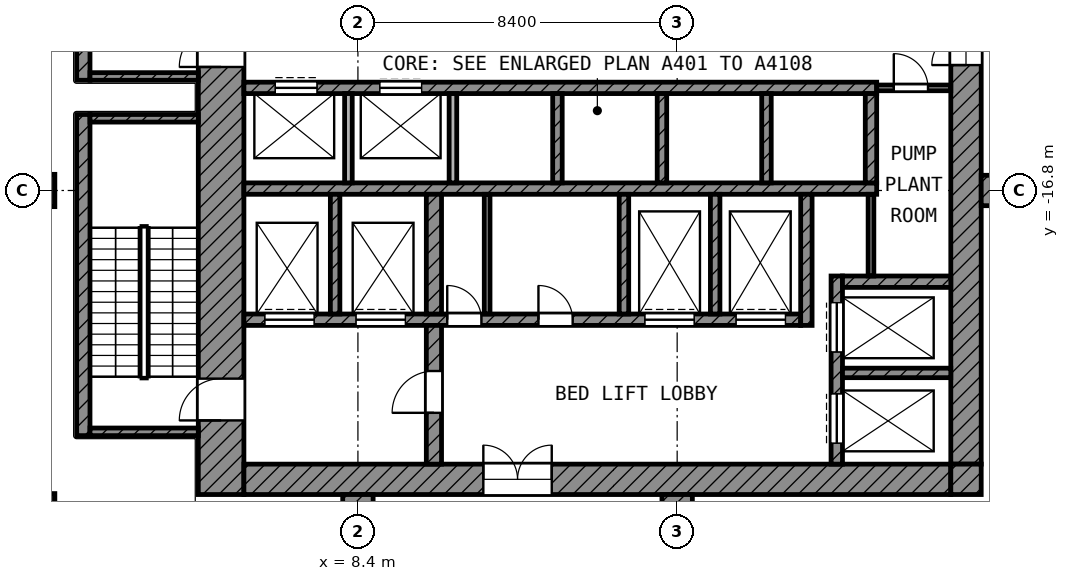
"""IFC4 building model, lengths in metres.
Left out: names, types, materials, properties, quantities, classifications, styles, units other than length and angle.
Written with IfcOpenShell. Run it as: python <this file> out.ifc"""

import sys

from ifc_helpers import new_model, si_unit, direction, frame, frame_2d, origin, origin_2d, place, context, subcontext, project, spatial, rectangle, extrude, element, fill, save


model = new_model("IFC4")
c1 = context("Model", 3, precision=1e-05, world=origin(), true_north=direction((0.0, 1.0)))
c2 = subcontext(c1, "Body", "Model", "MODEL_VIEW")
j1 = project(units=[si_unit("LENGTHUNIT", "METRE"), si_unit("PLANEANGLEUNIT", "RADIAN")], contexts=[c1])
p1 = place(None, origin())
s1 = spatial("IfcSite", under=j1, at=p1, CompositionType="ELEMENT")
p2 = place(p1, origin())
s2 = spatial("IfcBuilding", under=s1, at=p2, CompositionType="ELEMENT")
p3 = place(p2, frame((0.0, 0.0, 213.0)))
s3 = spatial("IfcBuildingStorey", under=s2, at=p3, CompositionType="ELEMENT", Elevation=213.0)
for number, where, z_axis, x_axis in (
    (1, (0.0, -16.8, 0.0), (0.0, 0.0, 1.0), (1.0, 0.0, 0.0)),
    (2, (0.0, -25.2, 0.0), (0.0, 0.0, 1.0), (1.0, 0.0, 0.0)),
):
    element("IfcColumn", number, at=place(p3, frame(where, z_axis=z_axis, x_axis=x_axis)), inside=s3, PredefinedType="COLUMN", context=c2, shape_type="SweptSolid", body=[
        extrude(rectangle(XDim=0.85, YDim=0.85, at=origin_2d()), origin(), (0.0, 0.0, 1.0), 5.0),
    ])
for number, where, z_axis, x_axis in (
    (3, (24.8, -16.8, 0.0), (0.0, 0.0, 1.0), (1.0, 0.0, 0.0)),
    (4, (8.4, -24.8, 0.0), (0.0, 0.0, 1.0), (0.0, -1.0, 0.0)),
    (5, (16.8, -24.8, 0.0), (0.0, 0.0, 1.0), (0.0, -1.0, 0.0)),
):
    element("IfcWall", number, at=place(p3, frame(where, z_axis=z_axis, x_axis=x_axis)), inside=s3, PredefinedType="SHEAR", context=c2, shape_type="SweptSolid", body=[
        extrude(rectangle(XDim=8.35, YDim=0.8, at=frame_2d((4.175, 0.0))), origin(), (0.0, 0.0, 1.0), 4.4),
    ])
p4 = place(p3, frame((4.8, -24.8, 0.0), z_axis=(0.0, 0.0, 1.0), x_axis=(0.0, 1.0, 0.0)))
e6 = element("IfcWall", 6, at=p4, inside=s3, PredefinedType="SHEAR", context=c2, shape_type="SweptSolid", body=[
    extrude(rectangle(XDim=19.4, YDim=1.2, at=frame_2d((9.7, 0.0))), origin(), (0.0, 0.0, 1.0), 4.4),
])
p5 = place(p4, frame((11.25, 0.0, 0.0)))
e7 = element("IfcOpeningElement", 7, at=p5, cuts=e6, PredefinedType="OPENING", context=c2, shape_type="SweptSolid", body=[
    extrude(rectangle(XDim=1.1, YDim=2.1, at=frame_2d((0.55, 1.05))), frame((0.0, 0.61, 0.0), z_axis=(0.0, -1.0, 0.0), x_axis=(1.0, 0.0, 0.0)), (0.0, 0.0, 1.0), 1.22),
])
p6 = place(p4, frame((1.95, 0.0, 0.0)))
e8 = element("IfcOpeningElement", 8, at=p6, cuts=e6, PredefinedType="OPENING", context=c2, shape_type="SweptSolid", body=[
    extrude(rectangle(XDim=1.1, YDim=2.1, at=frame_2d((0.55, 1.05))), frame((0.0, 0.61, 0.0), z_axis=(0.0, -1.0, 0.0), x_axis=(1.0, 0.0, 0.0)), (0.0, 0.0, 1.0), 1.22),
])
p7 = place(p3, frame((24.4, -24.0, 0.0), z_axis=(0.0, 0.0, 1.0), x_axis=(0.0, 1.0, 0.0)))
e9 = element("IfcWall", 9, at=p7, inside=s3, PredefinedType="SHEAR", context=c2, shape_type="SweptSolid", body=[
    extrude(rectangle(XDim=18.6, YDim=0.8, at=frame_2d((9.3, 0.0))), origin(), (0.0, 0.0, 1.0), 4.4),
])
p8 = place(p7, frame((10.5, 0.0, 0.0)))
e10 = element("IfcOpeningElement", 10, at=p8, cuts=e9, PredefinedType="OPENING", context=c2, shape_type="SweptSolid", body=[
    extrude(rectangle(XDim=1.8, YDim=2.1, at=frame_2d((0.9, 1.05))), frame((0.0, 0.41, 0.0), z_axis=(0.0, -1.0, 0.0), x_axis=(1.0, 0.0, 0.0)), (0.0, 0.0, 1.0), 0.82),
])
p9 = place(p3, frame((5.4, -24.4, 0.0), z_axis=(0.0, 0.0, 1.0), x_axis=(1.0, 0.0, 0.0)))
e11 = element("IfcWall", 11, at=p9, inside=s3, PredefinedType="SHEAR", context=c2, shape_type="SweptSolid", body=[
    extrude(rectangle(XDim=18.6, YDim=0.8, at=frame_2d((9.3, 0.0))), origin(), (0.0, 0.0, 1.0), 4.4),
])
p10 = place(p9, frame((6.3, 0.0, 0.0)))
e12 = element("IfcOpeningElement", 12, at=p10, cuts=e11, PredefinedType="OPENING", context=c2, shape_type="SweptSolid", body=[
    extrude(rectangle(XDim=1.8, YDim=2.1, at=frame_2d((0.9, 1.05))), frame((0.0, 0.41, 0.0), z_axis=(0.0, -1.0, 0.0), x_axis=(1.0, 0.0, 0.0)), (0.0, 0.0, 1.0), 0.82),
])
p11 = place(p3, frame((24.4, -24.8, 0.0), z_axis=(0.0, 0.0, 1.0), x_axis=(0.0, 1.0, 0.0)))
e13 = element("IfcWall", 13, at=p11, inside=s3, PredefinedType="SHEAR", context=c2, shape_type="SweptSolid", body=[
    extrude(rectangle(XDim=0.8, YDim=0.8, at=frame_2d((0.4, 0.0))), origin(), (0.0, 0.0, 1.0), 4.4),
])
p12 = place(p3, frame((5.4, -14.1, 0.0), z_axis=(0.0, 0.0, 1.0), x_axis=(1.0, 0.0, 0.0)))
e14 = element("IfcWall", 14, at=p12, inside=s3, PredefinedType="SHEAR", context=c2, shape_type="SweptSolid", body=[
    extrude(rectangle(XDim=16.65, YDim=0.3, at=frame_2d((8.325, 0.0))), origin(), (0.0, 0.0, 1.0), 4.4),
])
p13 = place(p12, frame((0.825, 0.0, 0.0)))
e15 = element("IfcOpeningElement", 15, at=p13, cuts=e14, PredefinedType="OPENING", context=c2, shape_type="SweptSolid", body=[
    extrude(rectangle(XDim=1.1, YDim=2.1, at=frame_2d((0.55, 1.05))), frame((0.0, 0.16, 0.0), z_axis=(0.0, -1.0, 0.0), x_axis=(1.0, 0.0, 0.0)), (0.0, 0.0, 1.0), 0.32),
])
p14 = place(p12, frame((3.575, 0.0, 0.0)))
e16 = element("IfcOpeningElement", 16, at=p14, cuts=e14, PredefinedType="OPENING", context=c2, shape_type="SweptSolid", body=[
    extrude(rectangle(XDim=1.1, YDim=2.1, at=frame_2d((0.55, 1.05))), frame((0.0, 0.16, 0.0), z_axis=(0.0, -1.0, 0.0), x_axis=(1.0, 0.0, 0.0)), (0.0, 0.0, 1.0), 0.32),
])
p15 = place(p3, frame((5.4, -16.75, 0.0), z_axis=(0.0, 0.0, 1.0), x_axis=(1.0, 0.0, 0.0)))
e17 = element("IfcWall", 17, at=p15, inside=s3, PredefinedType="SHEAR", context=c2, shape_type="SweptSolid", body=[
    extrude(rectangle(XDim=16.65, YDim=0.3, at=frame_2d((8.325, 0.0))), origin(), (0.0, 0.0, 1.0), 4.4),
])
p16 = place(p3, frame((5.4, -20.2, 0.0), z_axis=(0.0, 0.0, 1.0), x_axis=(1.0, 0.0, 0.0)))
e18 = element("IfcWall", 18, at=p16, inside=s3, PredefinedType="SHEAR", context=c2, shape_type="SweptSolid", body=[
    extrude(rectangle(XDim=14.65, YDim=0.3, at=frame_2d((7.325, 0.0))), origin(), (0.0, 0.0, 1.0), 4.4),
])
p17 = place(p16, frame((10.55, 0.0, 0.0)))
e19 = element("IfcOpeningElement", 19, at=p17, cuts=e18, PredefinedType="OPENING", context=c2, shape_type="SweptSolid", body=[
    extrude(rectangle(XDim=1.3, YDim=2.1, at=frame_2d((0.65, 1.05))), frame((0.0, 0.16, 0.0), z_axis=(0.0, -1.0, 0.0), x_axis=(1.0, 0.0, 0.0)), (0.0, 0.0, 1.0), 0.32),
])
p18 = place(p16, frame((12.95, 0.0, 0.0)))
e20 = element("IfcOpeningElement", 20, at=p18, cuts=e18, PredefinedType="OPENING", context=c2, shape_type="SweptSolid", body=[
    extrude(rectangle(XDim=1.3, YDim=2.1, at=frame_2d((0.65, 1.05))), frame((0.0, 0.16, 0.0), z_axis=(0.0, -1.0, 0.0), x_axis=(1.0, 0.0, 0.0)), (0.0, 0.0, 1.0), 0.32),
])
p19 = place(p16, frame((0.55, 0.0, 0.0)))
e21 = element("IfcOpeningElement", 21, at=p19, cuts=e18, PredefinedType="OPENING", context=c2, shape_type="SweptSolid", body=[
    extrude(rectangle(XDim=1.3, YDim=2.1, at=frame_2d((0.65, 1.05))), frame((0.0, 0.16, 0.0), z_axis=(0.0, -1.0, 0.0), x_axis=(1.0, 0.0, 0.0)), (0.0, 0.0, 1.0), 0.32),
])
p20 = place(p16, frame((2.95, 0.0, 0.0)))
e22 = element("IfcOpeningElement", 22, at=p20, cuts=e18, PredefinedType="OPENING", context=c2, shape_type="SweptSolid", body=[
    extrude(rectangle(XDim=1.3, YDim=2.1, at=frame_2d((0.65, 1.05))), frame((0.0, 0.16, 0.0), z_axis=(0.0, -1.0, 0.0), x_axis=(1.0, 0.0, 0.0)), (0.0, 0.0, 1.0), 0.32),
])
p21 = place(p16, frame((5.35, 0.0, 0.0)))
e23 = element("IfcOpeningElement", 23, at=p21, cuts=e18, PredefinedType="OPENING", context=c2, shape_type="SweptSolid", body=[
    extrude(rectangle(XDim=0.9, YDim=2.1, at=frame_2d((0.45, 1.05))), frame((0.0, 0.16, 0.0), z_axis=(0.0, -1.0, 0.0), x_axis=(1.0, 0.0, 0.0)), (0.0, 0.0, 1.0), 0.32),
])
p22 = place(p16, frame((7.75, 0.0, 0.0)))
e24 = element("IfcOpeningElement", 24, at=p22, cuts=e18, PredefinedType="OPENING", context=c2, shape_type="SweptSolid", body=[
    extrude(rectangle(XDim=0.9, YDim=2.1, at=frame_2d((0.45, 1.05))), frame((0.0, 0.16, 0.0), z_axis=(0.0, -1.0, 0.0), x_axis=(1.0, 0.0, 0.0)), (0.0, 0.0, 1.0), 0.32),
])
p23 = place(p3, frame((10.4, -24.0, 0.0), z_axis=(0.0, 0.0, 1.0), x_axis=(0.0, 1.0, 0.0)))
e25 = element("IfcWall", 25, at=p23, inside=s3, PredefinedType="SHEAR", context=c2, shape_type="SweptSolid", body=[
    extrude(rectangle(XDim=3.65, YDim=0.4, at=frame_2d((1.825, 0.0))), origin(), (0.0, 0.0, 1.0), 4.4),
])
p24 = place(p23, frame((1.35, 0.0, 0.0)))
e26 = element("IfcOpeningElement", 26, at=p24, cuts=e25, PredefinedType="OPENING", context=c2, shape_type="SweptSolid", body=[
    extrude(rectangle(XDim=1.1, YDim=2.1, at=frame_2d((0.55, 1.05))), frame((0.0, 0.21, 0.0), z_axis=(0.0, -1.0, 0.0), x_axis=(1.0, 0.0, 0.0)), (0.0, 0.0, 1.0), 0.42),
])
p25 = place(p3, frame((10.4, -20.05, 0.0), z_axis=(0.0, 0.0, 1.0), x_axis=(0.0, 1.0, 0.0)))
e27 = element("IfcWall", 27, at=p25, inside=s3, PredefinedType="SHEAR", context=c2, shape_type="SweptSolid", body=[
    extrude(rectangle(XDim=3.15, YDim=0.4, at=frame_2d((1.575, 0.0))), origin(), (0.0, 0.0, 1.0), 4.4),
])
p26 = place(p3, frame((20.2, -20.35, 0.0), z_axis=(0.0, 0.0, 1.0), x_axis=(0.0, 1.0, 0.0)))
e28 = element("IfcWall", 28, at=p26, inside=s3, PredefinedType="SHEAR", context=c2, shape_type="SweptSolid", body=[
    extrude(rectangle(XDim=3.45, YDim=0.3, at=frame_2d((1.725, 0.0))), origin(), (0.0, 0.0, 1.0), 4.4),
])
p27 = place(p3, frame((21.9, -16.6, 0.0), z_axis=(0.0, 0.0, 1.0), x_axis=(0.0, 1.0, 0.0)))
e29 = element("IfcWall", 29, at=p27, inside=s3, PredefinedType="SHEAR", context=c2, shape_type="SweptSolid", body=[
    extrude(rectangle(XDim=2.35, YDim=0.3, at=frame_2d((1.175, 0.0))), origin(), (0.0, 0.0, 1.0), 4.4),
])
p28 = place(p3, frame((21.15, -19.2, 0.0), z_axis=(0.0, 0.0, 1.0), x_axis=(1.0, 0.0, 0.0)))
e30 = element("IfcWall", 30, at=p28, inside=s3, PredefinedType="SHEAR", context=c2, shape_type="SweptSolid", body=[
    extrude(rectangle(XDim=2.85, YDim=0.3, at=frame_2d((1.425, 0.0))), origin(), (0.0, 0.0, 1.0), 4.4),
])
p29 = place(p3, frame((21.0, -24.0, 0.0), z_axis=(0.0, 0.0, 1.0), x_axis=(0.0, 1.0, 0.0)))
e31 = element("IfcWall", 31, at=p29, inside=s3, PredefinedType="SHEAR", context=c2, shape_type="SweptSolid", body=[
    extrude(rectangle(XDim=4.95, YDim=0.3, at=frame_2d((2.475, 0.0))), origin(), (0.0, 0.0, 1.0), 4.4),
])
p30 = place(p29, frame((2.95, 0.0, 0.0)))
e32 = element("IfcOpeningElement", 32, at=p30, cuts=e31, PredefinedType="OPENING", context=c2, shape_type="SweptSolid", body=[
    extrude(rectangle(XDim=1.3, YDim=2.1, at=frame_2d((0.65, 1.05))), frame((0.0, 0.16, 0.0), z_axis=(0.0, -1.0, 0.0), x_axis=(1.0, 0.0, 0.0)), (0.0, 0.0, 1.0), 0.32),
])
p31 = place(p29, frame((0.55, 0.0, 0.0)))
e33 = element("IfcOpeningElement", 33, at=p31, cuts=e31, PredefinedType="OPENING", context=c2, shape_type="SweptSolid", body=[
    extrude(rectangle(XDim=1.3, YDim=2.1, at=frame_2d((0.65, 1.05))), frame((0.0, 0.16, 0.0), z_axis=(0.0, -1.0, 0.0), x_axis=(1.0, 0.0, 0.0)), (0.0, 0.0, 1.0), 0.32),
])
p32 = place(p3, frame((21.15, -21.6, 0.0), z_axis=(0.0, 0.0, 1.0), x_axis=(1.0, 0.0, 0.0)))
e34 = element("IfcWall", 34, at=p32, inside=s3, PredefinedType="SHEAR", context=c2, shape_type="SweptSolid", body=[
    extrude(rectangle(XDim=2.85, YDim=0.25, at=frame_2d((1.425, 0.0))), origin(), (0.0, 0.0, 1.0), 4.4),
])
for number, where, z_axis, x_axis in (
    (35, (7.8, -20.05, 0.0), (0.0, 0.0, 1.0), (0.0, 1.0, 0.0)),
    (36, (15.4, -20.05, 0.0), (0.0, 0.0, 1.0), (0.0, 1.0, 0.0)),
    (37, (17.8, -20.05, 0.0), (0.0, 0.0, 1.0), (0.0, 1.0, 0.0)),
):
    element("IfcWall", number, at=place(p3, frame(where, z_axis=z_axis, x_axis=x_axis)), inside=s3, PredefinedType="SHEAR", context=c2, shape_type="SweptSolid", body=[
        extrude(rectangle(XDim=3.15, YDim=0.25, at=frame_2d((1.575, 0.0))), origin(), (0.0, 0.0, 1.0), 4.4),
    ])
for number, where, z_axis, x_axis in (
    (38, (8.15, -16.6, 0.0), (0.0, 0.0, 1.0), (0.0, 1.0, 0.0)),
    (39, (10.9, -16.6, 0.0), (0.0, 0.0, 1.0), (0.0, 1.0, 0.0)),
):
    element("IfcWall", number, at=place(p3, frame(where, z_axis=z_axis, x_axis=x_axis)), inside=s3, PredefinedType="PARTITIONING", context=c2, shape_type="SweptSolid", body=[
        extrude(rectangle(XDim=2.35, YDim=0.2, at=frame_2d((1.175, 0.0))), origin(), (0.0, 0.0, 1.0), 4.4),
    ])
for number, where, z_axis, x_axis in (
    (40, (13.65, -16.6, 0.0), (0.0, 0.0, 1.0), (0.0, 1.0, 0.0)),
    (41, (16.4, -16.6, 0.0), (0.0, 0.0, 1.0), (0.0, 1.0, 0.0)),
    (42, (19.15, -16.6, 0.0), (0.0, 0.0, 1.0), (0.0, 1.0, 0.0)),
):
    element("IfcWall", number, at=place(p3, frame(where, z_axis=z_axis, x_axis=x_axis)), inside=s3, PredefinedType="SHEAR", context=c2, shape_type="SweptSolid", body=[
        extrude(rectangle(XDim=2.35, YDim=0.25, at=frame_2d((1.175, 0.0))), origin(), (0.0, 0.0, 1.0), 4.4),
    ])
p33 = place(p3, frame((21.9, -19.05, 0.0), z_axis=(0.0, 0.0, 1.0), x_axis=(0.0, 1.0, 0.0)))
e43 = element("IfcWall", 43, at=p33, inside=s3, PredefinedType="PARTITIONING", context=c2, shape_type="SweptSolid", body=[
    extrude(rectangle(XDim=2.15, YDim=0.15, at=frame_2d((1.075, 0.0))), origin(), (0.0, 0.0, 1.0), 4.4),
])
p34 = place(p3, frame((22.05, -14.1, 0.0), z_axis=(0.0, 0.0, 1.0), x_axis=(1.0, 0.0, 0.0)))
e44 = element("IfcWall", 44, at=p34, inside=s3, PredefinedType="PARTITIONING", context=c2, shape_type="SweptSolid", body=[
    extrude(rectangle(XDim=1.95, YDim=0.15, at=frame_2d((0.975, 0.0))), origin(), (0.0, 0.0, 1.0), 4.4),
])
p35 = place(p34, frame((0.45, 0.0, 0.0)))
e45 = element("IfcOpeningElement", 45, at=p35, cuts=e44, PredefinedType="OPENING", context=c2, shape_type="SweptSolid", body=[
    extrude(rectangle(XDim=0.9, YDim=2.1, at=frame_2d((0.45, 1.05))), frame((0.0, 0.085, 0.0), z_axis=(0.0, -1.0, 0.0), x_axis=(1.0, 0.0, 0.0)), (0.0, 0.0, 1.0), 0.17),
])
p36 = place(p3, frame((11.8, -20.05, 0.0), z_axis=(0.0, 0.0, 1.0), x_axis=(0.0, 1.0, 0.0)))
e46 = element("IfcWall", 46, at=p36, inside=s3, PredefinedType="PARTITIONING", context=c2, shape_type="SweptSolid", body=[
    extrude(rectangle(XDim=3.15, YDim=0.15, at=frame_2d((1.575, 0.0))), origin(), (0.0, 0.0, 1.0), 4.4),
])
p37 = place(p3, frame((1.175, -13.9, 0.0), z_axis=(0.0, 0.0, 1.0), x_axis=(0.0, 1.0, 0.0)))
e47 = element("IfcWall", 47, at=p37, inside=s3, PredefinedType="SHEAR", context=c2, shape_type="SweptSolid", body=[
    extrude(rectangle(XDim=8.45, YDim=0.35, at=frame_2d((4.225, 0.0))), origin(), (0.0, 0.0, 1.0), 4.4),
])
p38 = place(p3, frame((1.35, -13.8, 0.0), z_axis=(0.0, 0.0, 1.0), x_axis=(1.0, 0.0, 0.0)))
e48 = element("IfcWall", 48, at=p38, inside=s3, PredefinedType="SHEAR", context=c2, shape_type="SweptSolid", body=[
    extrude(rectangle(XDim=2.85, YDim=0.2, at=frame_2d((1.425, 0.0))), origin(), (0.0, 0.0, 1.0), 4.4),
])
p39 = place(p3, frame((1.175, -23.25, 0.0), z_axis=(0.0, 0.0, 1.0), x_axis=(0.0, 1.0, 0.0)))
e49 = element("IfcWall", 49, at=p39, inside=s3, PredefinedType="SHEAR", context=c2, shape_type="SweptSolid", body=[
    extrude(rectangle(XDim=8.45, YDim=0.35, at=frame_2d((4.225, 0.0))), origin(), (0.0, 0.0, 1.0), 4.4),
])
for number, where, z_axis, x_axis in (
    (50, (1.35, -14.9, 0.0), (0.0, 0.0, 1.0), (1.0, 0.0, 0.0)),
    (51, (1.35, -23.15, 0.0), (0.0, 0.0, 1.0), (1.0, 0.0, 0.0)),
):
    element("IfcWall", number, at=place(p3, frame(where, z_axis=z_axis, x_axis=x_axis)), inside=s3, PredefinedType="SHEAR", context=c2, shape_type="SweptSolid", body=[
        extrude(rectangle(XDim=2.85, YDim=0.2, at=frame_2d((1.425, 0.0))), origin(), (0.0, 0.0, 1.0), 4.4),
    ])
p40 = place(p13, origin())
e52 = element("IfcDoor", 52, at=p40, inside=s3, OperationType="DOUBLE_DOOR_SLIDING", PredefinedType="DOOR", context=c2, shape_type="SweptSolid", body=[
    extrude(rectangle(XDim=1.1, YDim=2.1, at=frame_2d((0.55, 1.05))), frame((0.0, 0.025, 0.0), z_axis=(0.0, -1.0, 0.0), x_axis=(1.0, 0.0, 0.0)), (0.0, 0.0, 1.0), 0.05),
])
fill(e15, e52)
p41 = place(p14, origin())
e53 = element("IfcDoor", 53, at=p41, inside=s3, OperationType="DOUBLE_DOOR_SLIDING", PredefinedType="DOOR", context=c2, shape_type="SweptSolid", body=[
    extrude(rectangle(XDim=1.1, YDim=2.1, at=frame_2d((0.55, 1.05))), frame((0.0, 0.025, 0.0), z_axis=(0.0, -1.0, 0.0), x_axis=(1.0, 0.0, 0.0)), (0.0, 0.0, 1.0), 0.05),
])
fill(e16, e53)
p42 = place(p30, origin())
e54 = element("IfcDoor", 54, at=p42, inside=s3, OperationType="DOUBLE_DOOR_SLIDING", PredefinedType="DOOR", context=c2, shape_type="SweptSolid", body=[
    extrude(rectangle(XDim=1.3, YDim=2.1, at=frame_2d((0.65, 1.05))), frame((0.0, 0.025, 0.0), z_axis=(0.0, -1.0, 0.0), x_axis=(1.0, 0.0, 0.0)), (0.0, 0.0, 1.0), 0.05),
])
fill(e32, e54)
p43 = place(p31, origin())
e55 = element("IfcDoor", 55, at=p43, inside=s3, OperationType="DOUBLE_DOOR_SLIDING", PredefinedType="DOOR", context=c2, shape_type="SweptSolid", body=[
    extrude(rectangle(XDim=1.3, YDim=2.1, at=frame_2d((0.65, 1.05))), frame((0.0, 0.025, 0.0), z_axis=(0.0, -1.0, 0.0), x_axis=(1.0, 0.0, 0.0)), (0.0, 0.0, 1.0), 0.05),
])
fill(e33, e55)
p44 = place(p17, origin())
e56 = element("IfcDoor", 56, at=p44, inside=s3, OperationType="DOUBLE_DOOR_SLIDING", PredefinedType="DOOR", context=c2, shape_type="SweptSolid", body=[
    extrude(rectangle(XDim=1.3, YDim=2.1, at=frame_2d((0.65, 1.05))), frame((0.0, 0.025, 0.0), z_axis=(0.0, -1.0, 0.0), x_axis=(1.0, 0.0, 0.0)), (0.0, 0.0, 1.0), 0.05),
])
fill(e19, e56)
p45 = place(p18, origin())
e57 = element("IfcDoor", 57, at=p45, inside=s3, OperationType="DOUBLE_DOOR_SLIDING", PredefinedType="DOOR", context=c2, shape_type="SweptSolid", body=[
    extrude(rectangle(XDim=1.3, YDim=2.1, at=frame_2d((0.65, 1.05))), frame((0.0, 0.025, 0.0), z_axis=(0.0, -1.0, 0.0), x_axis=(1.0, 0.0, 0.0)), (0.0, 0.0, 1.0), 0.05),
])
fill(e20, e57)
p46 = place(p19, origin())
e58 = element("IfcDoor", 58, at=p46, inside=s3, OperationType="DOUBLE_DOOR_SLIDING", PredefinedType="DOOR", context=c2, shape_type="SweptSolid", body=[
    extrude(rectangle(XDim=1.3, YDim=2.1, at=frame_2d((0.65, 1.05))), frame((0.0, 0.025, 0.0), z_axis=(0.0, -1.0, 0.0), x_axis=(1.0, 0.0, 0.0)), (0.0, 0.0, 1.0), 0.05),
])
fill(e21, e58)
p47 = place(p20, origin())
e59 = element("IfcDoor", 59, at=p47, inside=s3, OperationType="DOUBLE_DOOR_SLIDING", PredefinedType="DOOR", context=c2, shape_type="SweptSolid", body=[
    extrude(rectangle(XDim=1.3, YDim=2.1, at=frame_2d((0.65, 1.05))), frame((0.0, 0.025, 0.0), z_axis=(0.0, -1.0, 0.0), x_axis=(1.0, 0.0, 0.0)), (0.0, 0.0, 1.0), 0.05),
])
fill(e22, e59)
p48 = place(p5, origin())
e60 = element("IfcDoor", 60, at=p48, inside=s3, OperationType="SINGLE_SWING_LEFT", PredefinedType="DOOR", context=c2, shape_type="SweptSolid", body=[
    extrude(rectangle(XDim=1.1, YDim=2.1, at=frame_2d((0.55, 1.05))), frame((0.0, 0.025, 0.0), z_axis=(0.0, -1.0, 0.0), x_axis=(1.0, 0.0, 0.0)), (0.0, 0.0, 1.0), 0.05),
])
fill(e7, e60)
p49 = place(p6, origin())
e61 = element("IfcDoor", 61, at=p49, inside=s3, OperationType="SINGLE_SWING_LEFT", PredefinedType="DOOR", context=c2, shape_type="SweptSolid", body=[
    extrude(rectangle(XDim=1.1, YDim=2.1, at=frame_2d((0.55, 1.05))), frame((0.0, 0.025, 0.0), z_axis=(0.0, -1.0, 0.0), x_axis=(1.0, 0.0, 0.0)), (0.0, 0.0, 1.0), 0.05),
])
fill(e8, e61)
p50 = place(p24, origin())
e62 = element("IfcDoor", 62, at=p50, inside=s3, OperationType="SINGLE_SWING_LEFT", PredefinedType="DOOR", context=c2, shape_type="SweptSolid", body=[
    extrude(rectangle(XDim=1.1, YDim=2.1, at=frame_2d((0.55, 1.05))), frame((0.0, 0.025, 0.0), z_axis=(0.0, -1.0, 0.0), x_axis=(1.0, 0.0, 0.0)), (0.0, 0.0, 1.0), 0.05),
])
fill(e26, e62)
p51 = place(p8, origin())
e63 = element("IfcDoor", 63, at=p51, inside=s3, OperationType="DOUBLE_DOOR_SINGLE_SWING", PredefinedType="DOOR", context=c2, shape_type="SweptSolid", body=[
    extrude(rectangle(XDim=1.8, YDim=2.1, at=frame_2d((0.9, 1.05))), frame((0.0, 0.025, 0.0), z_axis=(0.0, -1.0, 0.0), x_axis=(1.0, 0.0, 0.0)), (0.0, 0.0, 1.0), 0.05),
])
fill(e10, e63)
p52 = place(p10, origin())
e64 = element("IfcDoor", 64, at=p52, inside=s3, OperationType="DOUBLE_DOOR_SINGLE_SWING", PredefinedType="DOOR", context=c2, shape_type="SweptSolid", body=[
    extrude(rectangle(XDim=1.8, YDim=2.1, at=frame_2d((0.9, 1.05))), frame((0.0, 0.025, 0.0), z_axis=(0.0, -1.0, 0.0), x_axis=(1.0, 0.0, 0.0)), (0.0, 0.0, 1.0), 0.05),
])
fill(e12, e64)
p53 = place(p35, origin())
e65 = element("IfcDoor", 65, at=p53, inside=s3, OperationType="SINGLE_SWING_LEFT", PredefinedType="DOOR", context=c2, shape_type="SweptSolid", body=[
    extrude(rectangle(XDim=0.9, YDim=2.1, at=frame_2d((0.45, 1.05))), frame((0.0, 0.025, 0.0), z_axis=(0.0, -1.0, 0.0), x_axis=(1.0, 0.0, 0.0)), (0.0, 0.0, 1.0), 0.05),
])
fill(e45, e65)
p54 = place(p21, origin())
e66 = element("IfcDoor", 66, at=p54, inside=s3, OperationType="SINGLE_SWING_LEFT", PredefinedType="DOOR", context=c2, shape_type="SweptSolid", body=[
    extrude(rectangle(XDim=0.9, YDim=2.1, at=frame_2d((0.45, 1.05))), frame((0.0, 0.025, 0.0), z_axis=(0.0, -1.0, 0.0), x_axis=(1.0, 0.0, 0.0)), (0.0, 0.0, 1.0), 0.05),
])
fill(e23, e66)
p55 = place(p22, origin())
e67 = element("IfcDoor", 67, at=p55, inside=s3, OperationType="SINGLE_SWING_LEFT", PredefinedType="DOOR", context=c2, shape_type="SweptSolid", body=[
    extrude(rectangle(XDim=0.9, YDim=2.1, at=frame_2d((0.45, 1.05))), frame((0.0, 0.025, 0.0), z_axis=(0.0, -1.0, 0.0), x_axis=(1.0, 0.0, 0.0)), (0.0, 0.0, 1.0), 0.05),
])
fill(e24, e67)
save(model, sys.argv[1])
